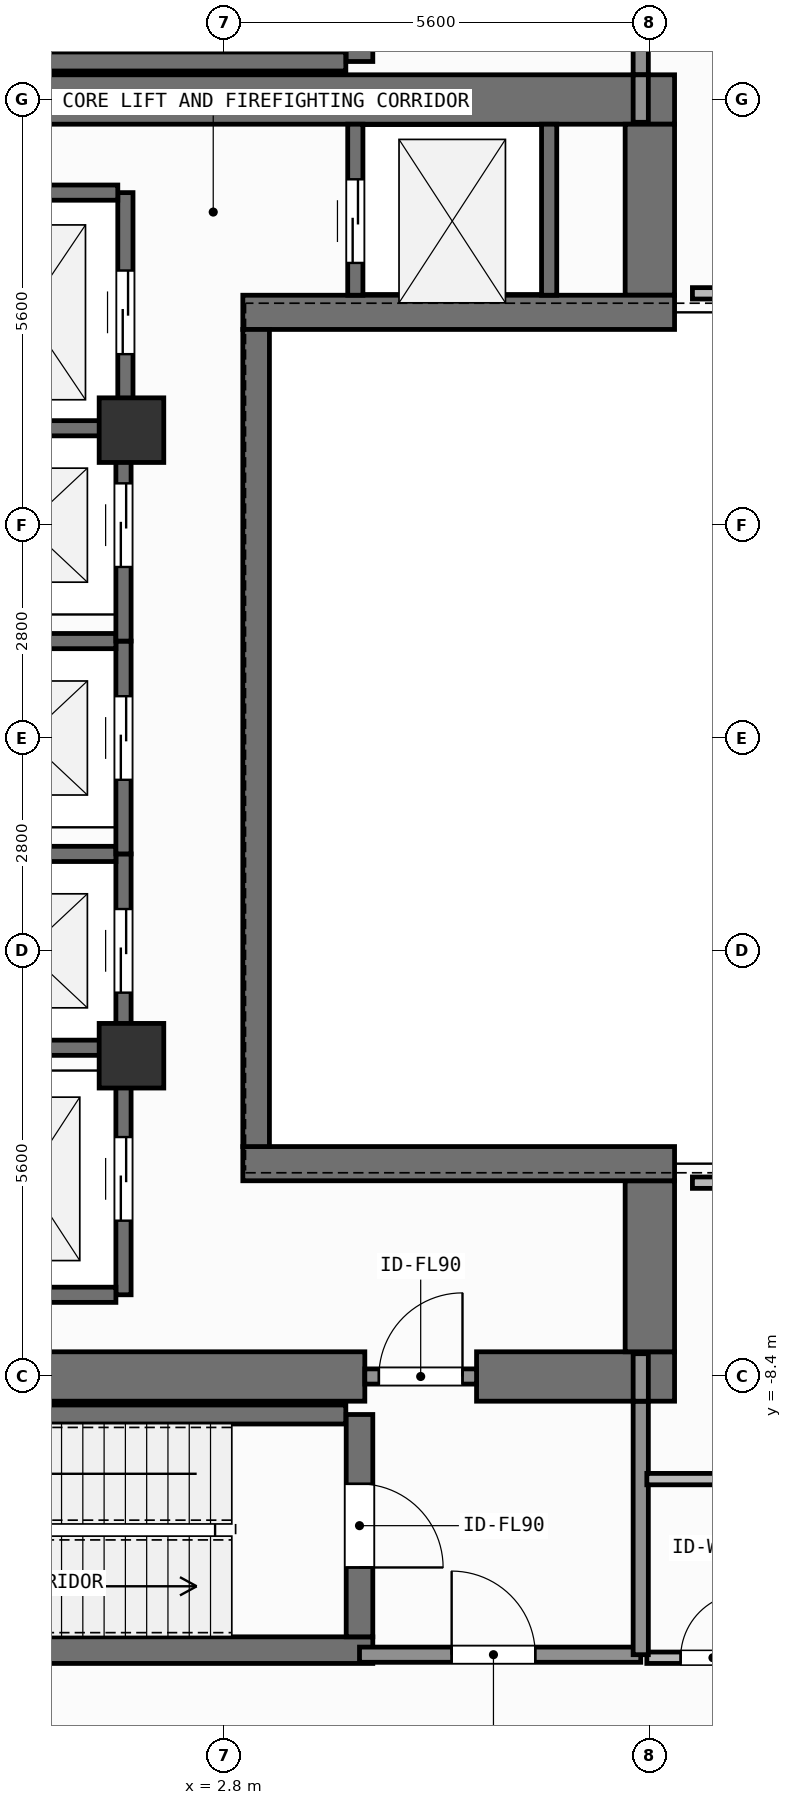
"""IFC4 building model, lengths in metres.
Left out: names, types, materials, properties, quantities, classifications, styles, units other than length and angle.
Written with IfcOpenShell. Run it as: python <this file> out.ifc"""

import sys

from ifc_helpers import new_model, si_unit, direction, frame, frame_2d, origin, origin_2d, place, context, subcontext, project, spatial, rectangle, extrude, element, fill, save


model = new_model("IFC4")
c1 = context("Model", 3, precision=1e-05, world=origin(), true_north=direction((0.0, 1.0)))
c2 = subcontext(c1, "Body", "Model", "MODEL_VIEW")
j1 = project(units=[si_unit("LENGTHUNIT", "METRE"), si_unit("PLANEANGLEUNIT", "RADIAN")], contexts=[c1])
p1 = place(None, origin())
s1 = spatial("IfcSite", under=j1, at=p1, CompositionType="ELEMENT")
p2 = place(p1, origin())
s2 = spatial("IfcBuilding", under=s1, at=p2, CompositionType="ELEMENT")
p3 = place(p2, frame((0.0, 0.0, 285.9)))
s3 = spatial("IfcBuildingStorey", under=s2, at=p3, CompositionType="ELEMENT", Elevation=285.9)
p4 = place(p3, frame((-2.62, -8.4, 0.0), z_axis=(0.0, 0.0, 1.0), x_axis=(1.0, 0.0, 0.0)))
e1 = element("IfcWall", 1, at=p4, inside=s3, PredefinedType="SHEAR", context=c2, shape_type="SweptSolid", body=[
    extrude(rectangle(XDim=7.27, YDim=0.65, at=frame_2d((3.635, 0.0))), origin(), (0.0, 0.0, 1.0), 3.9),
])
p5 = place(p3, frame((6.12, -8.4, 0.0), z_axis=(0.0, 0.0, 1.0), x_axis=(1.0, 0.0, 0.0)))
e2 = element("IfcWall", 2, at=p5, inside=s3, PredefinedType="SHEAR", context=c2, shape_type="SweptSolid", body=[
    extrude(rectangle(XDim=2.605, YDim=0.65, at=frame_2d((1.302, 0.0))), origin(), (0.0, 0.0, 1.0), 3.9),
])
p6 = place(p3, frame((-7.55, 8.4, 0.0), z_axis=(0.0, 0.0, 1.0), x_axis=(1.0, 0.0, 0.0)))
e3 = element("IfcWall", 3, at=p6, inside=s3, PredefinedType="SHEAR", context=c2, shape_type="SweptSolid", body=[
    extrude(rectangle(XDim=16.275, YDim=0.65, at=frame_2d((8.138, 0.0))), origin(), (0.0, 0.0, 1.0), 3.9),
])
for number, where, z_axis, x_axis in (
    (4, (8.4, -8.075, 0.0), (0.0, 0.0, 1.0), (0.0, 1.0, 0.0)),
    (5, (8.4, 5.825, 0.0), (0.0, 0.0, 1.0), (0.0, 1.0, 0.0)),
):
    element("IfcWall", number, at=place(p3, frame(where, z_axis=z_axis, x_axis=x_axis)), inside=s3, PredefinedType="SHEAR", context=c2, shape_type="SweptSolid", body=[
        extrude(rectangle(XDim=2.25, YDim=0.65, at=frame_2d((1.125, 0.0))), origin(), (0.0, 0.0, 1.0), 3.9),
    ])
for number, where, z_axis, x_axis in (
    (6, (3.045, -5.6, 0.0), (0.0, 0.0, 1.0), (1.0, 0.0, 0.0)),
    (7, (3.045, 5.6, 0.0), (0.0, 0.0, 1.0), (1.0, 0.0, 0.0)),
):
    element("IfcWall", number, at=place(p3, frame(where, z_axis=z_axis, x_axis=x_axis)), inside=s3, PredefinedType="SHEAR", context=c2, shape_type="SweptSolid", body=[
        extrude(rectangle(XDim=5.68, YDim=0.45, at=frame_2d((2.84, 0.0))), origin(), (0.0, 0.0, 1.0), 3.9),
    ])
p7 = place(p3, frame((3.22, -5.375, 0.0), z_axis=(0.0, 0.0, 1.0), x_axis=(0.0, 1.0, 0.0)))
e8 = element("IfcWall", 8, at=p7, inside=s3, PredefinedType="SHEAR", context=c2, shape_type="SweptSolid", body=[
    extrude(rectangle(XDim=10.75, YDim=0.35, at=frame_2d((5.375, 0.0))), origin(), (0.0, 0.0, 1.0), 3.9),
])
p8 = place(p3, frame((-2.555, -12.0, 0.0), z_axis=(0.0, 0.0, 1.0), x_axis=(1.0, 0.0, 0.0)))
e9 = element("IfcWall", 9, at=p8, inside=s3, PredefinedType="SHEAR", context=c2, shape_type="SweptSolid", body=[
    extrude(rectangle(XDim=7.31, YDim=0.35, at=frame_2d((3.655, 0.0))), origin(), (0.0, 0.0, 1.0), 3.9),
])
p9 = place(p3, frame((-2.2, -8.9, 0.0), z_axis=(0.0, 0.0, 1.0), x_axis=(1.0, 0.0, 0.0)))
e10 = element("IfcWall", 10, at=p9, inside=s3, PredefinedType="SHEAR", context=c2, shape_type="SweptSolid", body=[
    extrude(rectangle(XDim=6.6, YDim=0.25, at=frame_2d((3.3, 0.0))), origin(), (0.0, 0.0, 1.0), 3.9),
])
p10 = place(p3, frame((4.58, -8.9, 0.0), z_axis=(0.0, 0.0, 1.0), x_axis=(0.0, -1.0, 0.0)))
e11 = element("IfcWall", 11, at=p10, inside=s3, PredefinedType="SHEAR", context=c2, shape_type="SweptSolid", body=[
    extrude(rectangle(XDim=2.925, YDim=0.35, at=frame_2d((1.462, 0.0))), origin(), (0.0, 0.0, 1.0), 3.9),
])
p11 = place(p10, frame((0.913, 0.0, 0.0)))
e12 = element("IfcOpeningElement", 12, at=p11, cuts=e11, PredefinedType="OPENING", context=c2, shape_type="SweptSolid", body=[
    extrude(rectangle(XDim=1.1, YDim=2.15, at=frame_2d((0.55, 1.075))), frame((0.0, 0.185, 0.0), z_axis=(0.0, -1.0, 0.0), x_axis=(1.0, 0.0, 0.0)), (0.0, 0.0, 1.0), 0.37),
])
p12 = place(p3, frame((-2.2, 8.9, 0.0), z_axis=(0.0, 0.0, 1.0), x_axis=(1.0, 0.0, 0.0)))
e13 = element("IfcWall", 13, at=p12, inside=s3, PredefinedType="SHEAR", context=c2, shape_type="SweptSolid", body=[
    extrude(rectangle(XDim=6.6, YDim=0.25, at=frame_2d((3.3, 0.0))), origin(), (0.0, 0.0, 1.0), 3.9),
])
p13 = place(p3, frame((4.58, 11.825, 0.0), z_axis=(0.0, 0.0, 1.0), x_axis=(0.0, -1.0, 0.0)))
e14 = element("IfcWall", 14, at=p13, inside=s3, PredefinedType="SHEAR", context=c2, shape_type="SweptSolid", body=[
    extrude(rectangle(XDim=2.925, YDim=0.35, at=frame_2d((1.462, 0.0))), origin(), (0.0, 0.0, 1.0), 3.9),
])
p14 = place(p13, frame((0.913, 0.0, 0.0)))
e15 = element("IfcOpeningElement", 15, at=p14, cuts=e14, PredefinedType="OPENING", context=c2, shape_type="SweptSolid", body=[
    extrude(rectangle(XDim=1.1, YDim=2.15, at=frame_2d((0.55, 1.075))), frame((0.0, 0.185, 0.0), z_axis=(0.0, -1.0, 0.0), x_axis=(1.0, 0.0, 0.0)), (0.0, 0.0, 1.0), 0.37),
])
for number, where, z_axis, x_axis in (
    (16, (1.58, -4.18, 0.0), (0.0, 0.0, 1.0), (1.0, 0.0, 0.0)),
    (17, (1.58, 4.05, 0.0), (0.0, 0.0, 1.0), (1.0, 0.0, 0.0)),
):
    element("IfcColumn", number, at=place(p3, frame(where, z_axis=z_axis, x_axis=x_axis)), inside=s3, PredefinedType="COLUMN", context=c2, shape_type="SweptSolid", body=[
        extrude(rectangle(XDim=0.85, YDim=0.85, at=origin_2d()), origin(), (0.0, 0.0, 1.0), 3.9),
    ])
p15 = place(p3, frame((1.475, -4.275, 0.0), z_axis=(0.0, 0.0, 1.0), x_axis=(0.0, 1.0, 0.0)))
e18 = element("IfcWall", 18, at=p15, inside=s3, PredefinedType="SHEAR", context=c2, shape_type="SweptSolid", body=[
    extrude(rectangle(XDim=2.75, YDim=0.2, at=frame_2d((1.375, 0.0))), origin(), (0.0, 0.0, 1.0), 3.68),
])
p16 = place(p15, frame((0.925, 0.0, 0.0)))
e19 = element("IfcOpeningElement", 19, at=p16, cuts=e18, PredefinedType="OPENING", context=c2, shape_type="SweptSolid", body=[
    extrude(rectangle(XDim=1.1, YDim=2.2, at=frame_2d((0.55, 1.1))), frame((0.0, 0.11, 0.0), z_axis=(0.0, -1.0, 0.0), x_axis=(1.0, 0.0, 0.0)), (0.0, 0.0, 1.0), 0.22),
])
for number, where, z_axis, x_axis in (
    (20, (-0.975, -4.075, 0.0), (0.0, 0.0, 1.0), (1.0, 0.0, 0.0)),
    (21, (-0.975, -1.525, 0.0), (0.0, 0.0, 1.0), (1.0, 0.0, 0.0)),
):
    element("IfcWall", number, at=place(p3, frame(where, z_axis=z_axis, x_axis=x_axis)), inside=s3, PredefinedType="SHEAR", context=c2, shape_type="SweptSolid", body=[
        extrude(rectangle(XDim=2.35, YDim=0.2, at=frame_2d((1.175, 0.0))), origin(), (0.0, 0.0, 1.0), 3.68),
    ])
p17 = place(p3, frame((1.475, -1.525, 0.0), z_axis=(0.0, 0.0, 1.0), x_axis=(0.0, 1.0, 0.0)))
e22 = element("IfcWall", 22, at=p17, inside=s3, PredefinedType="SHEAR", context=c2, shape_type="SweptSolid", body=[
    extrude(rectangle(XDim=2.8, YDim=0.2, at=frame_2d((1.4, 0.0))), origin(), (0.0, 0.0, 1.0), 3.68),
])
p18 = place(p17, frame((0.975, 0.0, 0.0)))
e23 = element("IfcOpeningElement", 23, at=p18, cuts=e22, PredefinedType="OPENING", context=c2, shape_type="SweptSolid", body=[
    extrude(rectangle(XDim=1.1, YDim=2.2, at=frame_2d((0.55, 1.1))), frame((0.0, 0.11, 0.0), z_axis=(0.0, -1.0, 0.0), x_axis=(1.0, 0.0, 0.0)), (0.0, 0.0, 1.0), 0.22),
])
p19 = place(p3, frame((-0.975, 1.275, 0.0), z_axis=(0.0, 0.0, 1.0), x_axis=(1.0, 0.0, 0.0)))
e24 = element("IfcWall", 24, at=p19, inside=s3, PredefinedType="SHEAR", context=c2, shape_type="SweptSolid", body=[
    extrude(rectangle(XDim=2.35, YDim=0.2, at=frame_2d((1.175, 0.0))), origin(), (0.0, 0.0, 1.0), 3.68),
])
p20 = place(p3, frame((1.475, 1.275, 0.0), z_axis=(0.0, 0.0, 1.0), x_axis=(0.0, 1.0, 0.0)))
e25 = element("IfcWall", 25, at=p20, inside=s3, PredefinedType="SHEAR", context=c2, shape_type="SweptSolid", body=[
    extrude(rectangle(XDim=2.8, YDim=0.2, at=frame_2d((1.4, 0.0))), origin(), (0.0, 0.0, 1.0), 3.68),
])
p21 = place(p20, frame((0.975, 0.0, 0.0)))
e26 = element("IfcOpeningElement", 26, at=p21, cuts=e25, PredefinedType="OPENING", context=c2, shape_type="SweptSolid", body=[
    extrude(rectangle(XDim=1.1, YDim=2.2, at=frame_2d((0.55, 1.1))), frame((0.0, 0.11, 0.0), z_axis=(0.0, -1.0, 0.0), x_axis=(1.0, 0.0, 0.0)), (0.0, 0.0, 1.0), 0.22),
])
p22 = place(p3, frame((-0.975, 4.075, 0.0), z_axis=(0.0, 0.0, 1.0), x_axis=(1.0, 0.0, 0.0)))
e27 = element("IfcWall", 27, at=p22, inside=s3, PredefinedType="SHEAR", context=c2, shape_type="SweptSolid", body=[
    extrude(rectangle(XDim=2.35, YDim=0.2, at=frame_2d((1.175, 0.0))), origin(), (0.0, 0.0, 1.0), 3.68),
])
p23 = place(p3, frame((1.5, 4.025, 0.0), z_axis=(0.0, 0.0, 1.0), x_axis=(0.0, 1.0, 0.0)))
e28 = element("IfcWall", 28, at=p23, inside=s3, PredefinedType="SHEAR", context=c2, shape_type="SweptSolid", body=[
    extrude(rectangle(XDim=3.15, YDim=0.2, at=frame_2d((1.575, 0.0))), origin(), (0.0, 0.0, 1.0), 3.68),
])
p24 = place(p23, frame((1.025, 0.0, 0.0)))
e29 = element("IfcOpeningElement", 29, at=p24, cuts=e28, PredefinedType="OPENING", context=c2, shape_type="SweptSolid", body=[
    extrude(rectangle(XDim=1.1, YDim=2.2, at=frame_2d((0.55, 1.1))), frame((0.0, 0.11, 0.0), z_axis=(0.0, -1.0, 0.0), x_axis=(1.0, 0.0, 0.0)), (0.0, 0.0, 1.0), 0.22),
])
p25 = place(p3, frame((-1.0, 7.175, 0.0), z_axis=(0.0, 0.0, 1.0), x_axis=(1.0, 0.0, 0.0)))
e30 = element("IfcWall", 30, at=p25, inside=s3, PredefinedType="SHEAR", context=c2, shape_type="SweptSolid", body=[
    extrude(rectangle(XDim=2.4, YDim=0.2, at=frame_2d((1.2, 0.0))), origin(), (0.0, 0.0, 1.0), 3.68),
])
p26 = place(p3, frame((1.475, -7.325, 0.0), z_axis=(0.0, 0.0, 1.0), x_axis=(0.0, 1.0, 0.0)))
e31 = element("IfcWall", 31, at=p26, inside=s3, PredefinedType="SHEAR", context=c2, shape_type="SweptSolid", body=[
    extrude(rectangle(XDim=3.05, YDim=0.2, at=frame_2d((1.525, 0.0))), origin(), (0.0, 0.0, 1.0), 3.68),
])
p27 = place(p26, frame((0.975, 0.0, 0.0)))
e32 = element("IfcOpeningElement", 32, at=p27, cuts=e31, PredefinedType="OPENING", context=c2, shape_type="SweptSolid", body=[
    extrude(rectangle(XDim=1.1, YDim=2.2, at=frame_2d((0.55, 1.1))), frame((0.0, 0.11, 0.0), z_axis=(0.0, -1.0, 0.0), x_axis=(1.0, 0.0, 0.0)), (0.0, 0.0, 1.0), 0.22),
])
p28 = place(p3, frame((-0.975, -7.325, 0.0), z_axis=(0.0, 0.0, 1.0), x_axis=(1.0, 0.0, 0.0)))
e33 = element("IfcWall", 33, at=p28, inside=s3, PredefinedType="SHEAR", context=c2, shape_type="SweptSolid", body=[
    extrude(rectangle(XDim=2.35, YDim=0.2, at=frame_2d((1.175, 0.0))), origin(), (0.0, 0.0, 1.0), 3.68),
])
p29 = place(p3, frame((4.525, 5.825, 0.0), z_axis=(0.0, 0.0, 1.0), x_axis=(0.0, 1.0, 0.0)))
e34 = element("IfcWall", 34, at=p29, inside=s3, PredefinedType="SHEAR", context=c2, shape_type="SweptSolid", body=[
    extrude(rectangle(XDim=2.25, YDim=0.2, at=frame_2d((1.125, 0.0))), origin(), (0.0, 0.0, 1.0), 3.68),
])
p30 = place(p29, frame((0.425, 0.0, 0.0)))
e35 = element("IfcOpeningElement", 35, at=p30, cuts=e34, PredefinedType="OPENING", context=c2, shape_type="SweptSolid", body=[
    extrude(rectangle(XDim=1.1, YDim=2.2, at=frame_2d((0.55, 1.1))), frame((0.0, 0.11, 0.0), z_axis=(0.0, -1.0, 0.0), x_axis=(1.0, 0.0, 0.0)), (0.0, 0.0, 1.0), 0.22),
])
p31 = place(p3, frame((7.075, 5.825, 0.0), z_axis=(0.0, 0.0, 1.0), x_axis=(0.0, 1.0, 0.0)))
e36 = element("IfcWall", 36, at=p31, inside=s3, PredefinedType="SHEAR", context=c2, shape_type="SweptSolid", body=[
    extrude(rectangle(XDim=2.25, YDim=0.2, at=frame_2d((1.125, 0.0))), origin(), (0.0, 0.0, 1.0), 3.68),
])
p32 = place(p3, frame((4.58, -12.06, 0.0), z_axis=(0.0, 0.0, 1.0), x_axis=(1.0, 0.0, 0.0)))
e37 = element("IfcWall", 37, at=p32, inside=s3, PredefinedType="SOLIDWALL", context=c2, shape_type="SweptSolid", body=[
    extrude(rectangle(XDim=3.7, YDim=0.2, at=frame_2d((1.85, 0.0))), origin(), (0.0, 0.0, 1.0), 3.68),
])
p33 = place(p32, frame((1.212, 0.0, 0.0)))
e38 = element("IfcOpeningElement", 38, at=p33, cuts=e37, PredefinedType="OPENING", context=c2, shape_type="SweptSolid", body=[
    extrude(rectangle(XDim=1.1, YDim=2.15, at=frame_2d((0.55, 1.075))), frame((0.0, 0.11, 0.0), z_axis=(0.0, -1.0, 0.0), x_axis=(1.0, 0.0, 0.0)), (0.0, 0.0, 1.0), 0.22),
])
p34 = place(p3, frame((4.65, -8.4, 0.0), z_axis=(0.0, 0.0, 1.0), x_axis=(1.0, 0.0, 0.0)))
e39 = element("IfcWall", 39, at=p34, inside=s3, PredefinedType="SOLIDWALL", context=c2, shape_type="SweptSolid", body=[
    extrude(rectangle(XDim=1.47, YDim=0.2, at=frame_2d((0.735, 0.0))), origin(), (0.0, 0.0, 1.0), 2.92),
])
p35 = place(p34, frame((0.185, 0.0, 0.0)))
e40 = element("IfcOpeningElement", 40, at=p35, cuts=e39, PredefinedType="OPENING", context=c2, shape_type="SweptSolid", body=[
    extrude(rectangle(XDim=1.1, YDim=2.15, at=frame_2d((0.55, 1.075))), frame((0.0, 0.11, 0.0), z_axis=(0.0, -1.0, 0.0), x_axis=(1.0, 0.0, 0.0)), (0.0, 0.0, 1.0), 0.22),
])
p36 = place(p3, frame((8.36, -12.1, 0.0), z_axis=(0.0, 0.0, 1.0), x_axis=(1.0, 0.0, 0.0)))
e41 = element("IfcWall", 41, at=p36, inside=s3, PredefinedType="PARTITIONING", context=c2, shape_type="SweptSolid", body=[
    extrude(rectangle(XDim=1.74, YDim=0.15, at=frame_2d((0.87, 0.0))), origin(), (0.0, 0.0, 1.0), 3.68),
])
p37 = place(p36, frame((0.445, 0.0, 0.0)))
e42 = element("IfcOpeningElement", 42, at=p37, cuts=e41, PredefinedType="OPENING", context=c2, shape_type="SweptSolid", body=[
    extrude(rectangle(XDim=0.85, YDim=2.1, at=frame_2d((0.425, 1.05))), frame((0.0, 0.085, 0.0), z_axis=(0.0, -1.0, 0.0), x_axis=(1.0, 0.0, 0.0)), (0.0, 0.0, 1.0), 0.17),
])
for number, where, z_axis, x_axis in (
    (43, (8.28, -12.06, 0.0), (0.0, 0.0, 1.0), (0.0, 1.0, 0.0)),
    (44, (8.28, 8.725, 0.0), (0.0, 0.0, 1.0), (0.0, 1.0, 0.0)),
):
    element("IfcWall", number, at=place(p3, frame(where, z_axis=z_axis, x_axis=x_axis)), inside=s3, PredefinedType="SOLIDWALL", context=c2, shape_type="SweptSolid", body=[
        extrude(rectangle(XDim=3.335, YDim=0.2, at=frame_2d((1.667, 0.0))), origin(), (0.0, 0.0, 1.0), 3.68),
    ])
p38 = place(p3, frame((8.28, -8.725, 0.0), z_axis=(0.0, 0.0, 1.0), x_axis=(0.0, 1.0, 0.0)))
e45 = element("IfcWall", 45, at=p38, inside=s3, PredefinedType="SOLIDWALL", context=c2, shape_type="SweptSolid", body=[
    extrude(rectangle(XDim=0.625, YDim=0.2, at=frame_2d((0.312, 0.0))), origin(), (0.0, 0.0, 1.0), 3.68),
])
p39 = place(p3, frame((8.36, -9.75, 0.0), z_axis=(0.0, 0.0, 1.0), x_axis=(1.0, 0.0, 0.0)))
e46 = element("IfcWall", 46, at=p39, inside=s3, PredefinedType="PARTITIONING", context=c2, shape_type="SweptSolid", body=[
    extrude(rectangle(XDim=1.74, YDim=0.15, at=frame_2d((0.87, 0.0))), origin(), (0.0, 0.0, 1.0), 3.68),
])
p40 = place(p3, frame((8.96, -5.85, 0.0), z_axis=(0.0, 0.0, 1.0), x_axis=(1.0, 0.0, 0.0)))
e47 = element("IfcWall", 47, at=p40, inside=s3, PredefinedType="PARTITIONING", context=c2, shape_type="SweptSolid", body=[
    extrude(rectangle(XDim=6.62, YDim=0.15, at=frame_2d((3.31, 0.0))), origin(), (0.0, 0.0, 1.0), 3.68),
])
p41 = place(p3, frame((8.28, 8.1, 0.0), z_axis=(0.0, 0.0, 1.0), x_axis=(0.0, 1.0, 0.0)))
e48 = element("IfcWall", 48, at=p41, inside=s3, PredefinedType="SOLIDWALL", context=c2, shape_type="SweptSolid", body=[
    extrude(rectangle(XDim=0.625, YDim=0.2, at=frame_2d((0.312, 0.0))), origin(), (0.0, 0.0, 1.0), 3.68),
])
p42 = place(p3, frame((8.96, 5.85, 0.0), z_axis=(0.0, 0.0, 1.0), x_axis=(1.0, 0.0, 0.0)))
e49 = element("IfcWall", 49, at=p42, inside=s3, PredefinedType="PARTITIONING", context=c2, shape_type="SweptSolid", body=[
    extrude(rectangle(XDim=6.62, YDim=0.15, at=frame_2d((3.31, 0.0))), origin(), (0.0, 0.0, 1.0), 3.68),
])
p43 = place(p16, origin())
e50 = element("IfcDoor", 50, at=p43, inside=s3, OperationType="SLIDING_TO_LEFT", PredefinedType="DOOR", context=c2, shape_type="SweptSolid", body=[
    extrude(rectangle(XDim=1.1, YDim=2.2, at=frame_2d((0.55, 1.1))), frame((0.0, 0.025, 0.0), z_axis=(0.0, -1.0, 0.0), x_axis=(1.0, 0.0, 0.0)), (0.0, 0.0, 1.0), 0.05),
])
fill(e19, e50)
p44 = place(p18, origin())
e51 = element("IfcDoor", 51, at=p44, inside=s3, OperationType="SLIDING_TO_LEFT", PredefinedType="DOOR", context=c2, shape_type="SweptSolid", body=[
    extrude(rectangle(XDim=1.1, YDim=2.2, at=frame_2d((0.55, 1.1))), frame((0.0, 0.025, 0.0), z_axis=(0.0, -1.0, 0.0), x_axis=(1.0, 0.0, 0.0)), (0.0, 0.0, 1.0), 0.05),
])
fill(e23, e51)
p45 = place(p21, origin())
e52 = element("IfcDoor", 52, at=p45, inside=s3, OperationType="SLIDING_TO_LEFT", PredefinedType="DOOR", context=c2, shape_type="SweptSolid", body=[
    extrude(rectangle(XDim=1.1, YDim=2.2, at=frame_2d((0.55, 1.1))), frame((0.0, 0.025, 0.0), z_axis=(0.0, -1.0, 0.0), x_axis=(1.0, 0.0, 0.0)), (0.0, 0.0, 1.0), 0.05),
])
fill(e26, e52)
p46 = place(p24, origin())
e53 = element("IfcDoor", 53, at=p46, inside=s3, OperationType="SLIDING_TO_LEFT", PredefinedType="DOOR", context=c2, shape_type="SweptSolid", body=[
    extrude(rectangle(XDim=1.1, YDim=2.2, at=frame_2d((0.55, 1.1))), frame((0.0, 0.025, 0.0), z_axis=(0.0, -1.0, 0.0), x_axis=(1.0, 0.0, 0.0)), (0.0, 0.0, 1.0), 0.05),
])
fill(e29, e53)
p47 = place(p27, origin())
e54 = element("IfcDoor", 54, at=p47, inside=s3, OperationType="SLIDING_TO_LEFT", PredefinedType="DOOR", context=c2, shape_type="SweptSolid", body=[
    extrude(rectangle(XDim=1.1, YDim=2.2, at=frame_2d((0.55, 1.1))), frame((0.0, 0.025, 0.0), z_axis=(0.0, -1.0, 0.0), x_axis=(1.0, 0.0, 0.0)), (0.0, 0.0, 1.0), 0.05),
])
fill(e32, e54)
p48 = place(p30, origin())
e55 = element("IfcDoor", 55, at=p48, inside=s3, OperationType="SLIDING_TO_LEFT", PredefinedType="DOOR", context=c2, shape_type="SweptSolid", body=[
    extrude(rectangle(XDim=1.1, YDim=2.2, at=frame_2d((0.55, 1.1))), frame((0.0, 0.025, 0.0), z_axis=(0.0, -1.0, 0.0), x_axis=(1.0, 0.0, 0.0)), (0.0, 0.0, 1.0), 0.05),
])
fill(e35, e55)
p49 = place(p11, origin())
e56 = element("IfcDoor", 56, at=p49, inside=s3, OperationType="SINGLE_SWING_RIGHT", PredefinedType="DOOR", context=c2, shape_type="SweptSolid", body=[
    extrude(rectangle(XDim=1.1, YDim=2.15, at=frame_2d((0.55, 1.075))), frame((0.0, 0.025, 0.0), z_axis=(0.0, -1.0, 0.0), x_axis=(1.0, 0.0, 0.0)), (0.0, 0.0, 1.0), 0.05),
])
fill(e12, e56)
p50 = place(p33, origin())
e57 = element("IfcDoor", 57, at=p50, inside=s3, OperationType="SINGLE_SWING_LEFT", PredefinedType="DOOR", context=c2, shape_type="SweptSolid", body=[
    extrude(rectangle(XDim=1.1, YDim=2.15, at=frame_2d((0.55, 1.075))), frame((0.0, 0.025, 0.0), z_axis=(0.0, -1.0, 0.0), x_axis=(1.0, 0.0, 0.0)), (0.0, 0.0, 1.0), 0.05),
])
fill(e38, e57)
p51 = place(p35, origin())
e58 = element("IfcDoor", 58, at=p51, inside=s3, OperationType="SINGLE_SWING_RIGHT", PredefinedType="DOOR", context=c2, shape_type="SweptSolid", body=[
    extrude(rectangle(XDim=1.1, YDim=2.15, at=frame_2d((0.55, 1.075))), frame((0.0, 0.025, 0.0), z_axis=(0.0, -1.0, 0.0), x_axis=(1.0, 0.0, 0.0)), (0.0, 0.0, 1.0), 0.05),
])
fill(e40, e58)
p52 = place(p37, origin())
e59 = element("IfcDoor", 59, at=p52, inside=s3, OperationType="SINGLE_SWING_RIGHT", PredefinedType="DOOR", context=c2, shape_type="SweptSolid", body=[
    extrude(rectangle(XDim=0.85, YDim=2.1, at=frame_2d((0.425, 1.05))), frame((0.0, 0.025, 0.0), z_axis=(0.0, -1.0, 0.0), x_axis=(1.0, 0.0, 0.0)), (0.0, 0.0, 1.0), 0.05),
])
fill(e42, e59)
save(model, sys.argv[1])
